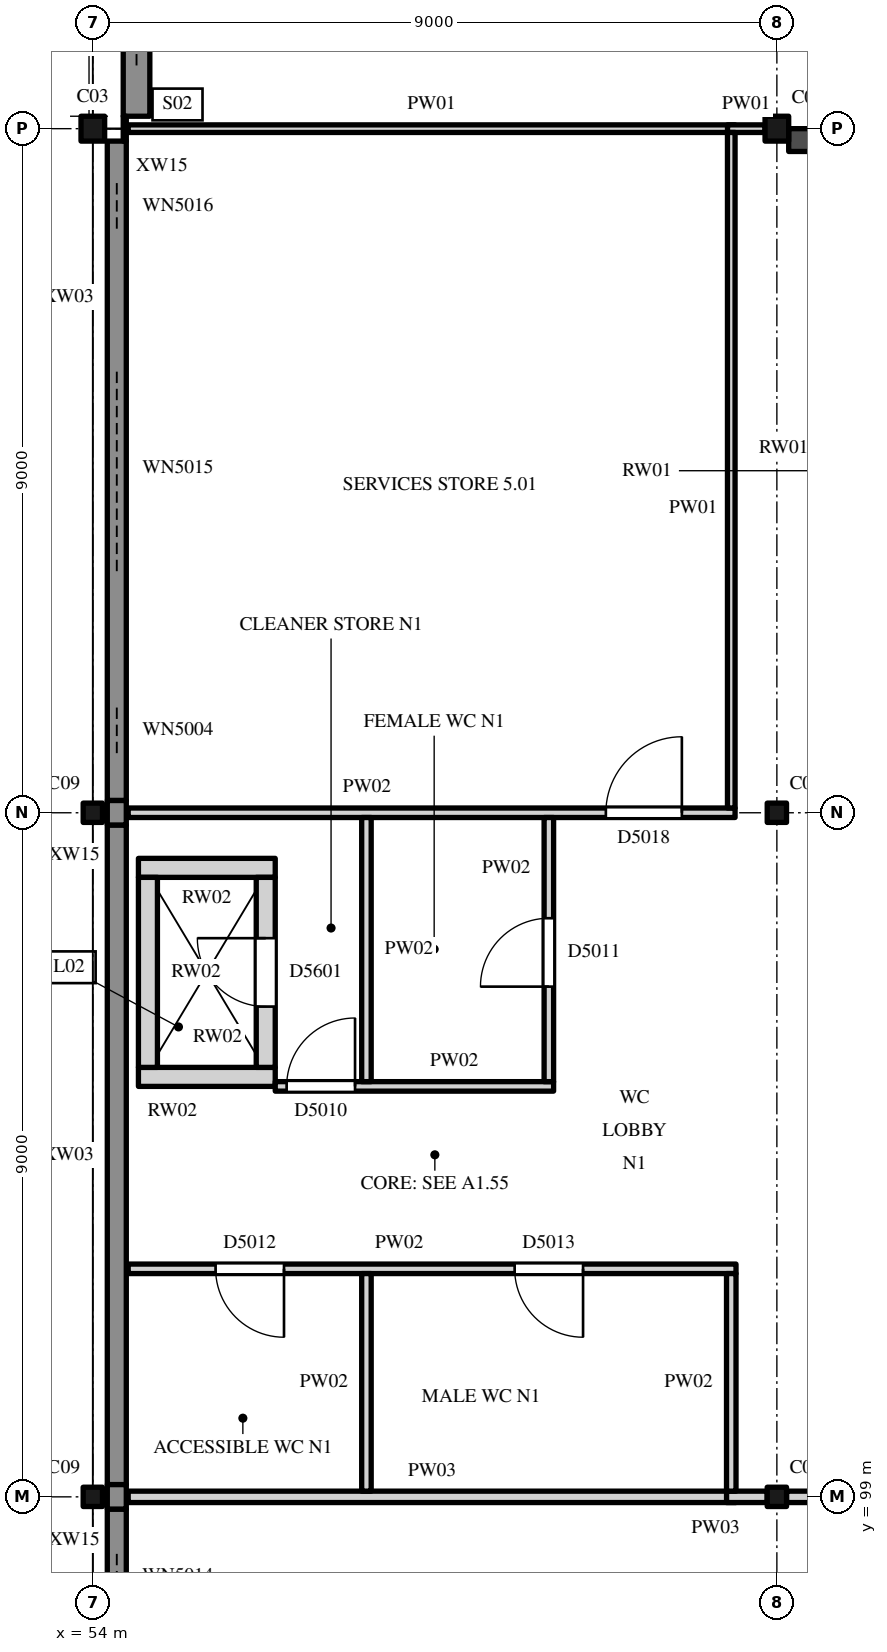
"""IFC4 building model, lengths in metres.
Left out: names, types, materials, properties, quantities, classifications, styles, units other than length and angle.
Written with IfcOpenShell. Run it as: python <this file> out.ifc"""

import sys

from ifc_helpers import new_model, si_unit, direction, frame, frame_2d, origin, origin_2d, place, context, subcontext, project, spatial, rectangle, i_section, extrude, element, fill, save


model = new_model("IFC4")
c1 = context("Model", 3, precision=1e-05, world=origin(), true_north=direction((0.0, 1.0)))
c2 = subcontext(c1, "Body", "Model", "MODEL_VIEW")
j1 = project(units=[si_unit("LENGTHUNIT", "METRE"), si_unit("PLANEANGLEUNIT", "RADIAN")], contexts=[c1])
p1 = place(None, origin())
s1 = spatial("IfcSite", under=j1, at=p1, CompositionType="ELEMENT")
p2 = place(p1, origin())
s2 = spatial("IfcBuilding", under=s1, at=p2, CompositionType="ELEMENT")
p3 = place(p2, frame((0.0, 0.0, 31.0)))
s3 = spatial("IfcBuildingStorey", under=s2, at=p3, CompositionType="ELEMENT", Elevation=31.0)
for number, where, z_axis, x_axis in (
    (1, (54.0, 99.0, 0.0), (0.0, 0.0, 1.0), (1.0, 0.0, 0.0)),
    (2, (63.0, 99.0, 0.0), (0.0, 0.0, 1.0), (1.0, 0.0, 0.0)),
    (3, (54.0, 108.0, 0.0), (0.0, 0.0, 1.0), (1.0, 0.0, 0.0)),
    (4, (63.0, 108.0, 0.0), (0.0, 0.0, 1.0), (1.0, 0.0, 0.0)),
):
    element("IfcColumn", number, at=place(p3, frame(where, z_axis=z_axis, x_axis=x_axis)), inside=s3, PredefinedType="COLUMN", context=c2, shape_type="SweptSolid", body=[
        extrude(i_section(OverallWidth=0.254, OverallDepth=0.254, WebThickness=0.009, FlangeThickness=0.014, FilletRadius=0.014, at=origin_2d()), origin(), (0.0, 0.0, 1.0), 5.0),
    ])
for number, where, z_axis, x_axis in (
    (5, (54.0, 117.0, 0.0), (0.0, 0.0, 1.0), (1.0, 0.0, 0.0)),
    (6, (63.0, 117.0, 0.0), (0.0, 0.0, 1.0), (1.0, 0.0, 0.0)),
):
    element("IfcColumn", number, at=place(p3, frame(where, z_axis=z_axis, x_axis=x_axis)), inside=s3, PredefinedType="COLUMN", context=c2, shape_type="SweptSolid", body=[
        extrude(i_section(OverallWidth=0.311, OverallDepth=0.327, WebThickness=0.016, FlangeThickness=0.025, FilletRadius=0.017, at=origin_2d()), origin(), (0.0, 0.0, 1.0), 5.0),
    ])
p4 = place(p3, frame((63.156, 116.85, 0.0), z_axis=(0.0, 0.0, 1.0), x_axis=(1.0, 0.0, 0.0)))
e7 = element("IfcWall", 7, at=p4, inside=s3, PredefinedType="SHEAR", context=c2, shape_type="SweptSolid", body=[
    extrude(rectangle(XDim=8.689, YDim=0.3, at=frame_2d((4.344, 0.0))), origin(), (0.0, 0.0, 1.0), 5.0),
])
for number, where, z_axis, x_axis in (
    (8, (54.6, 104.525, 0.0), (0.0, 0.0, 1.0), (1.0, 0.0, 0.0)),
    (9, (54.6, 107.275, 0.0), (0.0, 0.0, 1.0), (1.0, 0.0, 0.0)),
):
    element("IfcWall", number, at=place(p3, frame(where, z_axis=z_axis, x_axis=x_axis)), inside=s3, PredefinedType="STANDARD", context=c2, shape_type="SweptSolid", body=[
        extrude(rectangle(XDim=1.8, YDim=0.25, at=frame_2d((0.9, 0.0))), origin(), (0.0, 0.0, 1.0), 5.0),
    ])
p5 = place(p3, frame((54.725, 104.65, 0.0), z_axis=(0.0, 0.0, 1.0), x_axis=(0.0, 1.0, 0.0)))
e10 = element("IfcWall", 10, at=p5, inside=s3, PredefinedType="STANDARD", context=c2, shape_type="SweptSolid", body=[
    extrude(rectangle(XDim=2.5, YDim=0.25, at=frame_2d((1.25, 0.0))), origin(), (0.0, 0.0, 1.0), 5.0),
])
p6 = place(p3, frame((56.275, 104.65, 0.0), z_axis=(0.0, 0.0, 1.0), x_axis=(0.0, 1.0, 0.0)))
e11 = element("IfcWall", 11, at=p6, inside=s3, PredefinedType="STANDARD", context=c2, shape_type="SweptSolid", body=[
    extrude(rectangle(XDim=2.5, YDim=0.25, at=frame_2d((1.25, 0.0))), origin(), (0.0, 0.0, 1.0), 5.0),
])
p7 = place(p6, frame((0.8, 0.0, 0.0)))
e12 = element("IfcOpeningElement", 12, at=p7, cuts=e11, PredefinedType="OPENING", context=c2, shape_type="SweptSolid", body=[
    extrude(rectangle(XDim=0.9, YDim=2.1, at=frame_2d((0.45, 1.05))), frame((0.0, 0.135, 0.0), z_axis=(0.0, -1.0, 0.0), x_axis=(1.0, 0.0, 0.0)), (0.0, 0.0, 1.0), 0.27),
])
p8 = place(p3, frame((54.315, 90.164, 0.0), z_axis=(0.0, 0.0, 1.0), x_axis=(0.0, 1.0, 0.0)))
e13 = element("IfcWall", 13, at=p8, inside=s3, PredefinedType="SOLIDWALL", context=c2, shape_type="SweptSolid", body=[
    extrude(rectangle(XDim=8.676, YDim=0.25, at=frame_2d((4.338, 0.0))), origin(), (0.0, 0.0, 1.0), 4.504),
])
p9 = place(p8, frame((0.586, 0.0, 1.6)))
e14 = element("IfcOpeningElement", 14, at=p9, cuts=e13, PredefinedType="OPENING", context=c2, shape_type="SweptSolid", body=[
    extrude(rectangle(XDim=0.6, YDim=1.2, at=frame_2d((0.3, 0.6))), frame((0.0, 0.135, 0.0), z_axis=(0.0, -1.0, 0.0), x_axis=(1.0, 0.0, 0.0)), (0.0, 0.0, 1.0), 0.27),
])
p10 = place(p8, frame((2.992, 0.0, 1.6)))
e15 = element("IfcOpeningElement", 15, at=p10, cuts=e13, PredefinedType="OPENING", context=c2, shape_type="SweptSolid", body=[
    extrude(rectangle(XDim=2.7, YDim=1.2, at=frame_2d((1.35, 0.6))), frame((0.0, 0.135, 0.0), z_axis=(0.0, -1.0, 0.0), x_axis=(1.0, 0.0, 0.0)), (0.0, 0.0, 1.0), 0.27),
])
p11 = place(p8, frame((7.486, 0.0, 1.6)))
e16 = element("IfcOpeningElement", 16, at=p11, cuts=e13, PredefinedType="OPENING", context=c2, shape_type="SweptSolid", body=[
    extrude(rectangle(XDim=0.6, YDim=1.2, at=frame_2d((0.3, 0.6))), frame((0.0, 0.135, 0.0), z_axis=(0.0, -1.0, 0.0), x_axis=(1.0, 0.0, 0.0)), (0.0, 0.0, 1.0), 0.27),
])
p12 = place(p3, frame((54.315, 99.161, 0.0), z_axis=(0.0, 0.0, 1.0), x_axis=(0.0, 1.0, 0.0)))
e17 = element("IfcWall", 17, at=p12, inside=s3, PredefinedType="SOLIDWALL", context=c2, shape_type="SweptSolid", body=[
    extrude(rectangle(XDim=8.678, YDim=0.25, at=frame_2d((4.339, 0.0))), origin(), (0.0, 0.0, 1.0), 4.504),
])
p13 = place(p3, frame((54.315, 108.161, 0.0), z_axis=(0.0, 0.0, 1.0), x_axis=(0.0, 1.0, 0.0)))
e18 = element("IfcWall", 18, at=p13, inside=s3, PredefinedType="SOLIDWALL", context=c2, shape_type="SweptSolid", body=[
    extrude(rectangle(XDim=8.676, YDim=0.25, at=frame_2d((4.338, 0.0))), origin(), (0.0, 0.0, 1.0), 4.504),
])
p14 = place(p13, frame((0.623, 0.0, 1.6)))
e19 = element("IfcOpeningElement", 19, at=p14, cuts=e18, PredefinedType="OPENING", context=c2, shape_type="SweptSolid", body=[
    extrude(rectangle(XDim=0.6, YDim=1.2, at=frame_2d((0.3, 0.6))), frame((0.0, 0.135, 0.0), z_axis=(0.0, -1.0, 0.0), x_axis=(1.0, 0.0, 0.0)), (0.0, 0.0, 1.0), 0.27),
])
p15 = place(p13, frame((3.017, 0.0, 1.6)))
e20 = element("IfcOpeningElement", 20, at=p15, cuts=e18, PredefinedType="OPENING", context=c2, shape_type="SweptSolid", body=[
    extrude(rectangle(XDim=2.7, YDim=1.2, at=frame_2d((1.35, 0.6))), frame((0.0, 0.135, 0.0), z_axis=(0.0, -1.0, 0.0), x_axis=(1.0, 0.0, 0.0)), (0.0, 0.0, 1.0), 0.27),
])
p16 = place(p13, frame((7.523, 0.0, 1.6)))
e21 = element("IfcOpeningElement", 21, at=p16, cuts=e18, PredefinedType="OPENING", context=c2, shape_type="SweptSolid", body=[
    extrude(rectangle(XDim=0.6, YDim=1.2, at=frame_2d((0.3, 0.6))), frame((0.0, 0.135, 0.0), z_axis=(0.0, -1.0, 0.0), x_axis=(1.0, 0.0, 0.0)), (0.0, 0.0, 1.0), 0.27),
])
p17 = place(p3, frame((54.575, 117.164, 0.0), z_axis=(0.0, 0.0, 1.0), x_axis=(0.0, 1.0, 0.0)))
e22 = element("IfcWall", 22, at=p17, inside=s3, PredefinedType="SOLIDWALL", context=c2, shape_type="SweptSolid", body=[
    extrude(rectangle(XDim=8.836, YDim=0.35, at=frame_2d((4.418, 0.0))), origin(), (0.0, 0.0, 1.0), 4.825),
])
p18 = place(p17, frame((0.668, 0.0, 1.6)))
e23 = element("IfcOpeningElement", 23, at=p18, cuts=e22, PredefinedType="OPENING", context=c2, shape_type="SweptSolid", body=[
    extrude(rectangle(XDim=0.6, YDim=1.2, at=frame_2d((0.3, 0.6))), frame((0.0, 0.185, 0.0), z_axis=(0.0, -1.0, 0.0), x_axis=(1.0, 0.0, 0.0)), (0.0, 0.0, 1.0), 0.37),
])
p19 = place(p17, frame((3.042, 0.0, 1.6)))
e24 = element("IfcOpeningElement", 24, at=p19, cuts=e22, PredefinedType="OPENING", context=c2, shape_type="SweptSolid", body=[
    extrude(rectangle(XDim=2.7, YDim=1.2, at=frame_2d((1.35, 0.6))), frame((0.0, 0.185, 0.0), z_axis=(0.0, -1.0, 0.0), x_axis=(1.0, 0.0, 0.0)), (0.0, 0.0, 1.0), 0.37),
])
p20 = place(p17, frame((7.568, 0.0, 1.6)))
e25 = element("IfcOpeningElement", 25, at=p20, cuts=e22, PredefinedType="OPENING", context=c2, shape_type="SweptSolid", body=[
    extrude(rectangle(XDim=0.6, YDim=1.2, at=frame_2d((0.3, 0.6))), frame((0.0, 0.185, 0.0), z_axis=(0.0, -1.0, 0.0), x_axis=(1.0, 0.0, 0.0)), (0.0, 0.0, 1.0), 0.37),
])
for number, where, z_axis, x_axis in (
    (26, (54.315, 98.839, 0.0), (0.0, 0.0, 1.0), (0.0, 1.0, 0.0)),
    (27, (54.315, 107.839, 0.0), (0.0, 0.0, 1.0), (0.0, 1.0, 0.0)),
):
    element("IfcWall", number, at=place(p3, frame(where, z_axis=z_axis, x_axis=x_axis)), inside=s3, PredefinedType="SOLIDWALL", context=c2, shape_type="SweptSolid", body=[
        extrude(rectangle(XDim=0.322, YDim=0.25, at=frame_2d((0.161, 0.0))), origin(), (0.0, 0.0, 1.0), 4.504),
    ])
p21 = place(p3, frame((54.42, 116.836, 0.0), z_axis=(0.0, 0.0, 1.0), x_axis=(0.0, 1.0, 0.0)))
e28 = element("IfcWall", 28, at=p21, inside=s3, PredefinedType="SOLIDWALL", context=c2, shape_type="SweptSolid", body=[
    extrude(rectangle(XDim=0.327, YDim=0.04, at=frame_2d((0.164, 0.0))), origin(), (0.0, 0.0, 1.0), 4.825),
])
p22 = place(p3, frame((54.465, 99.0, 0.0), z_axis=(0.0, 0.0, 1.0), x_axis=(1.0, 0.0, 0.0)))
e29 = element("IfcWall", 29, at=p22, inside=s3, PredefinedType="PARTITIONING", context=c2, shape_type="SweptSolid", body=[
    extrude(rectangle(XDim=7.997, YDim=0.15, at=frame_2d((3.999, 0.0))), origin(), (0.0, 0.0, 1.0), 4.518),
])
p23 = place(p3, frame((62.338, 99.0, 0.0), z_axis=(0.0, 0.0, 1.0), x_axis=(1.0, 0.0, 0.0)))
e30 = element("IfcWall", 30, at=p23, inside=s3, PredefinedType="PARTITIONING", context=c2, shape_type="SweptSolid", body=[
    extrude(rectangle(XDim=0.535, YDim=0.15, at=frame_2d((0.268, 0.0))), origin(), (0.0, 0.0, 1.0), 4.518),
])
p24 = place(p3, frame((63.127, 99.0, 0.0), z_axis=(0.0, 0.0, 1.0), x_axis=(1.0, 0.0, 0.0)))
e31 = element("IfcWall", 31, at=p24, inside=s3, PredefinedType="PARTITIONING", context=c2, shape_type="SweptSolid", body=[
    extrude(rectangle(XDim=0.473, YDim=0.15, at=frame_2d((0.236, 0.0))), origin(), (0.0, 0.0, 1.0), 4.825),
])
p25 = place(p3, frame((54.465, 102.0, 0.0), z_axis=(0.0, 0.0, 1.0), x_axis=(1.0, 0.0, 0.0)))
e32 = element("IfcWall", 32, at=p25, inside=s3, PredefinedType="PARTITIONING", context=c2, shape_type="SweptSolid", body=[
    extrude(rectangle(XDim=7.997, YDim=0.125, at=frame_2d((3.999, 0.0))), origin(), (0.0, 0.0, 1.0), 4.521),
])
p26 = place(p25, frame((1.15, 0.0, 0.0)))
e33 = element("IfcOpeningElement", 33, at=p26, cuts=e32, PredefinedType="OPENING", context=c2, shape_type="SweptSolid", body=[
    extrude(rectangle(XDim=0.9, YDim=2.1, at=frame_2d((0.45, 1.05))), frame((0.0, 0.073, 0.0), z_axis=(0.0, -1.0, 0.0), x_axis=(1.0, 0.0, 0.0)), (0.0, 0.0, 1.0), 0.145),
])
p27 = place(p25, frame((5.085, 0.0, 0.0)))
e34 = element("IfcOpeningElement", 34, at=p27, cuts=e32, PredefinedType="OPENING", context=c2, shape_type="SweptSolid", body=[
    extrude(rectangle(XDim=0.9, YDim=2.1, at=frame_2d((0.45, 1.05))), frame((0.0, 0.073, 0.0), z_axis=(0.0, -1.0, 0.0), x_axis=(1.0, 0.0, 0.0)), (0.0, 0.0, 1.0), 0.145),
])
p28 = place(p3, frame((56.4, 104.4, 0.0), z_axis=(0.0, 0.0, 1.0), x_axis=(1.0, 0.0, 0.0)))
e35 = element("IfcWall", 35, at=p28, inside=s3, PredefinedType="PARTITIONING", context=c2, shape_type="SweptSolid", body=[
    extrude(rectangle(XDim=3.663, YDim=0.125, at=frame_2d((1.831, 0.0))), origin(), (0.0, 0.0, 1.0), 4.825),
])
p29 = place(p28, frame((0.15, 0.0, 0.0)))
e36 = element("IfcOpeningElement", 36, at=p29, cuts=e35, PredefinedType="OPENING", context=c2, shape_type="SweptSolid", body=[
    extrude(rectangle(XDim=0.9, YDim=2.1, at=frame_2d((0.45, 1.05))), frame((0.0, 0.073, 0.0), z_axis=(0.0, -1.0, 0.0), x_axis=(1.0, 0.0, 0.0)), (0.0, 0.0, 1.0), 0.145),
])
p30 = place(p3, frame((54.465, 108.0, 0.0), z_axis=(0.0, 0.0, 1.0), x_axis=(1.0, 0.0, 0.0)))
e37 = element("IfcWall", 37, at=p30, inside=s3, PredefinedType="PARTITIONING", context=c2, shape_type="SweptSolid", body=[
    extrude(rectangle(XDim=7.985, YDim=0.125, at=frame_2d((3.992, 0.0))), origin(), (0.0, 0.0, 1.0), 4.518),
])
p31 = place(p30, frame((6.285, 0.0, 0.0)))
e38 = element("IfcOpeningElement", 38, at=p31, cuts=e37, PredefinedType="OPENING", context=c2, shape_type="SweptSolid", body=[
    extrude(rectangle(XDim=1.0, YDim=2.1, at=frame_2d((0.5, 1.05))), frame((0.0, 0.073, 0.0), z_axis=(0.0, -1.0, 0.0), x_axis=(1.0, 0.0, 0.0)), (0.0, 0.0, 1.0), 0.145),
])
p32 = place(p3, frame((54.465, 117.0, 0.0), z_axis=(0.0, 0.0, 1.0), x_axis=(1.0, 0.0, 0.0)))
e39 = element("IfcWall", 39, at=p32, inside=s3, PredefinedType="PARTITIONING", context=c2, shape_type="SweptSolid", body=[
    extrude(rectangle(XDim=7.985, YDim=0.1, at=frame_2d((3.992, 0.0))), origin(), (0.0, 0.0, 1.0), 4.518),
])
p33 = place(p3, frame((62.351, 117.0, 0.0), z_axis=(0.0, 0.0, 1.0), x_axis=(1.0, 0.0, 0.0)))
e40 = element("IfcWall", 40, at=p33, inside=s3, PredefinedType="PARTITIONING", context=c2, shape_type="SweptSolid", body=[
    extrude(rectangle(XDim=0.494, YDim=0.1, at=frame_2d((0.247, 0.0))), origin(), (0.0, 0.0, 1.0), 4.825),
])
p34 = place(p3, frame((57.6, 99.075, 0.0), z_axis=(0.0, 0.0, 1.0), x_axis=(0.0, 1.0, 0.0)))
e41 = element("IfcWall", 41, at=p34, inside=s3, PredefinedType="PARTITIONING", context=c2, shape_type="SweptSolid", body=[
    extrude(rectangle(XDim=2.863, YDim=0.125, at=frame_2d((1.431, 0.0))), origin(), (0.0, 0.0, 1.0), 4.825),
])
p35 = place(p3, frame((57.6, 104.462, 0.0), z_axis=(0.0, 0.0, 1.0), x_axis=(0.0, 1.0, 0.0)))
e42 = element("IfcWall", 42, at=p35, inside=s3, PredefinedType="PARTITIONING", context=c2, shape_type="SweptSolid", body=[
    extrude(rectangle(XDim=3.475, YDim=0.125, at=frame_2d((1.738, 0.0))), origin(), (0.0, 0.0, 1.0), 4.825),
])
p36 = place(p3, frame((60.0, 104.462, 0.0), z_axis=(0.0, 0.0, 1.0), x_axis=(0.0, 1.0, 0.0)))
e43 = element("IfcWall", 43, at=p36, inside=s3, PredefinedType="PARTITIONING", context=c2, shape_type="SweptSolid", body=[
    extrude(rectangle(XDim=3.475, YDim=0.125, at=frame_2d((1.738, 0.0))), origin(), (0.0, 0.0, 1.0), 4.825),
])
p37 = place(p36, frame((1.25, 0.0, 0.0)))
e44 = element("IfcOpeningElement", 44, at=p37, cuts=e43, PredefinedType="OPENING", context=c2, shape_type="SweptSolid", body=[
    extrude(rectangle(XDim=0.9, YDim=2.1, at=frame_2d((0.45, 1.05))), frame((0.0, 0.073, 0.0), z_axis=(0.0, -1.0, 0.0), x_axis=(1.0, 0.0, 0.0)), (0.0, 0.0, 1.0), 0.145),
])
p38 = place(p3, frame((62.4, 99.075, 0.0), z_axis=(0.0, 0.0, 1.0), x_axis=(0.0, 1.0, 0.0)))
e45 = element("IfcWall", 45, at=p38, inside=s3, PredefinedType="PARTITIONING", context=c2, shape_type="SweptSolid", body=[
    extrude(rectangle(XDim=2.863, YDim=0.125, at=frame_2d((1.431, 0.0))), origin(), (0.0, 0.0, 1.0), 4.825),
])
p39 = place(p3, frame((62.4, 108.062, 0.0), z_axis=(0.0, 0.0, 1.0), x_axis=(0.0, 1.0, 0.0)))
e46 = element("IfcWall", 46, at=p39, inside=s3, PredefinedType="PARTITIONING", context=c2, shape_type="SweptSolid", body=[
    extrude(rectangle(XDim=8.887, YDim=0.1, at=frame_2d((4.444, 0.0))), origin(), (0.0, 0.0, 1.0), 4.825),
])
p40 = place(p7, origin())
e47 = element("IfcDoor", 47, at=p40, inside=s3, OperationType="SINGLE_SWING_LEFT", PredefinedType="DOOR", context=c2, shape_type="SweptSolid", body=[
    extrude(rectangle(XDim=0.9, YDim=2.1, at=frame_2d((0.45, 1.05))), frame((0.0, 0.025, 0.0), z_axis=(0.0, -1.0, 0.0), x_axis=(1.0, 0.0, 0.0)), (0.0, 0.0, 1.0), 0.05),
])
fill(e12, e47)
p41 = place(p11, origin())
e48 = element("IfcWindow", 48, at=p41, inside=s3, PartitioningType="SINGLE_PANEL", PredefinedType="WINDOW", context=c2, shape_type="SweptSolid", body=[
    extrude(rectangle(XDim=0.6, YDim=1.2, at=frame_2d((0.3, 0.6))), frame((0.0, 0.03, 0.0), z_axis=(0.0, -1.0, 0.0), x_axis=(1.0, 0.0, 0.0)), (0.0, 0.0, 1.0), 0.06),
])
fill(e16, e48)
p42 = place(p14, origin())
e49 = element("IfcWindow", 49, at=p42, inside=s3, PartitioningType="SINGLE_PANEL", PredefinedType="WINDOW", context=c2, shape_type="SweptSolid", body=[
    extrude(rectangle(XDim=0.6, YDim=1.2, at=frame_2d((0.3, 0.6))), frame((0.0, 0.03, 0.0), z_axis=(0.0, -1.0, 0.0), x_axis=(1.0, 0.0, 0.0)), (0.0, 0.0, 1.0), 0.06),
])
fill(e19, e49)
p43 = place(p15, origin())
e50 = element("IfcWindow", 50, at=p43, inside=s3, PartitioningType="SINGLE_PANEL", PredefinedType="WINDOW", context=c2, shape_type="SweptSolid", body=[
    extrude(rectangle(XDim=2.7, YDim=1.2, at=frame_2d((1.35, 0.6))), frame((0.0, 0.03, 0.0), z_axis=(0.0, -1.0, 0.0), x_axis=(1.0, 0.0, 0.0)), (0.0, 0.0, 1.0), 0.06),
])
fill(e20, e50)
p44 = place(p16, origin())
e51 = element("IfcWindow", 51, at=p44, inside=s3, PartitioningType="SINGLE_PANEL", PredefinedType="WINDOW", context=c2, shape_type="SweptSolid", body=[
    extrude(rectangle(XDim=0.6, YDim=1.2, at=frame_2d((0.3, 0.6))), frame((0.0, 0.03, 0.0), z_axis=(0.0, -1.0, 0.0), x_axis=(1.0, 0.0, 0.0)), (0.0, 0.0, 1.0), 0.06),
])
fill(e21, e51)
p45 = place(p18, origin())
e52 = element("IfcWindow", 52, at=p45, inside=s3, PartitioningType="SINGLE_PANEL", PredefinedType="WINDOW", context=c2, shape_type="SweptSolid", body=[
    extrude(rectangle(XDim=0.6, YDim=1.2, at=frame_2d((0.3, 0.6))), frame((0.0, 0.03, 0.0), z_axis=(0.0, -1.0, 0.0), x_axis=(1.0, 0.0, 0.0)), (0.0, 0.0, 1.0), 0.06),
])
fill(e23, e52)
p46 = place(p29, origin())
e53 = element("IfcDoor", 53, at=p46, inside=s3, OperationType="SINGLE_SWING_LEFT", PredefinedType="DOOR", context=c2, shape_type="SweptSolid", body=[
    extrude(rectangle(XDim=0.9, YDim=2.1, at=frame_2d((0.45, 1.05))), frame((0.0, 0.025, 0.0), z_axis=(0.0, -1.0, 0.0), x_axis=(1.0, 0.0, 0.0)), (0.0, 0.0, 1.0), 0.05),
])
fill(e36, e53)
p47 = place(p37, origin())
e54 = element("IfcDoor", 54, at=p47, inside=s3, OperationType="SINGLE_SWING_RIGHT", PredefinedType="DOOR", context=c2, shape_type="SweptSolid", body=[
    extrude(rectangle(XDim=0.9, YDim=2.1, at=frame_2d((0.45, 1.05))), frame((0.0, 0.025, 0.0), z_axis=(0.0, -1.0, 0.0), x_axis=(1.0, 0.0, 0.0)), (0.0, 0.0, 1.0), 0.05),
])
fill(e44, e54)
p48 = place(p26, origin())
e55 = element("IfcDoor", 55, at=p48, inside=s3, OperationType="SINGLE_SWING_RIGHT", PredefinedType="DOOR", context=c2, shape_type="SweptSolid", body=[
    extrude(rectangle(XDim=0.9, YDim=2.1, at=frame_2d((0.45, 1.05))), frame((0.0, 0.025, 0.0), z_axis=(0.0, -1.0, 0.0), x_axis=(1.0, 0.0, 0.0)), (0.0, 0.0, 1.0), 0.05),
])
fill(e33, e55)
p49 = place(p27, origin())
e56 = element("IfcDoor", 56, at=p49, inside=s3, OperationType="SINGLE_SWING_RIGHT", PredefinedType="DOOR", context=c2, shape_type="SweptSolid", body=[
    extrude(rectangle(XDim=0.9, YDim=2.1, at=frame_2d((0.45, 1.05))), frame((0.0, 0.025, 0.0), z_axis=(0.0, -1.0, 0.0), x_axis=(1.0, 0.0, 0.0)), (0.0, 0.0, 1.0), 0.05),
])
fill(e34, e56)
p50 = place(p31, origin())
e57 = element("IfcDoor", 57, at=p50, inside=s3, OperationType="SINGLE_SWING_LEFT", PredefinedType="DOOR", context=c2, shape_type="SweptSolid", body=[
    extrude(rectangle(XDim=1.0, YDim=2.1, at=frame_2d((0.5, 1.05))), frame((0.0, 0.025, 0.0), z_axis=(0.0, -1.0, 0.0), x_axis=(1.0, 0.0, 0.0)), (0.0, 0.0, 1.0), 0.05),
])
fill(e38, e57)
save(model, sys.argv[1])
